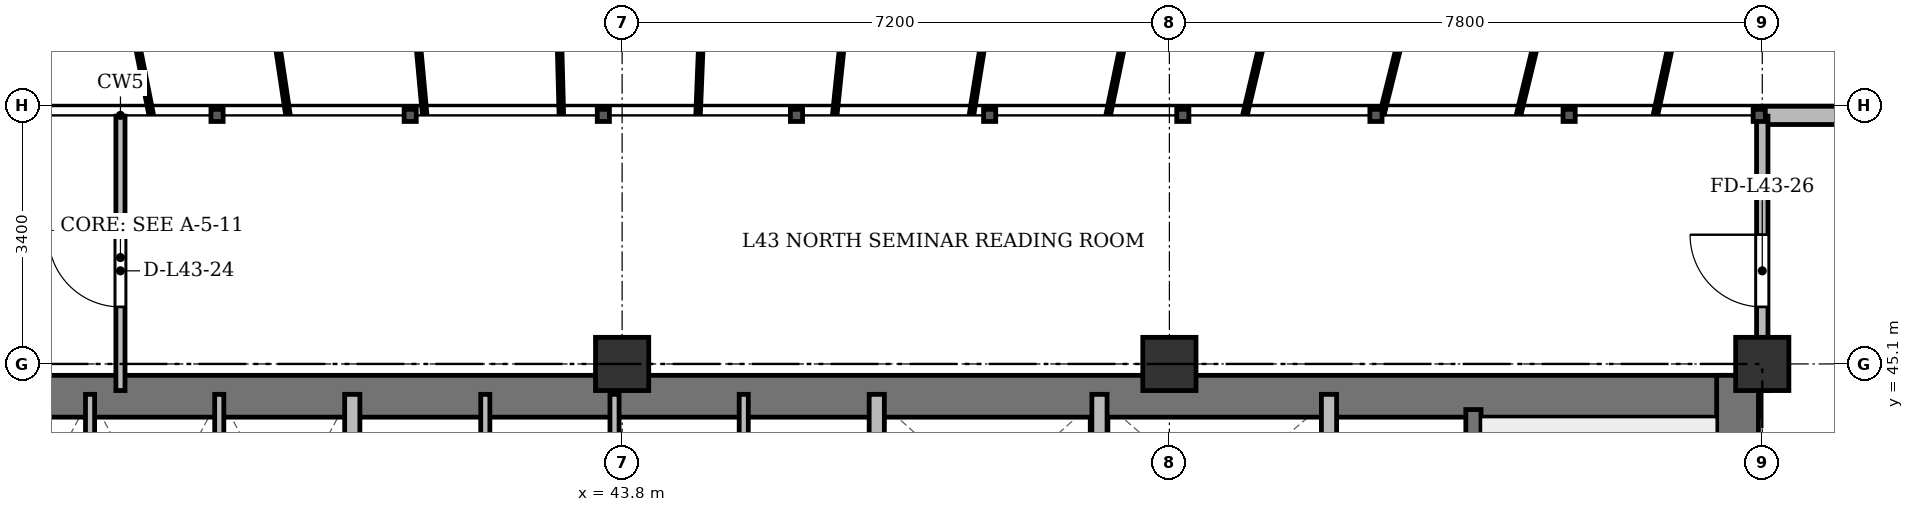
"""IFC4 building model, lengths in metres.
Left out: names, types, materials, properties, quantities, classifications, styles, units other than length and angle.
Written with IfcOpenShell. Run it as: python <this file> out.ifc"""

import sys

from ifc_helpers import new_model, si_unit, direction, frame, frame_2d, origin, origin_2d, place, context, subcontext, project, spatial, rectangle, extrude, source, transform, mapped, element, fill, save


model = new_model("IFC4")
c1 = context("Model", 3, precision=1e-05, world=origin(), true_north=direction((0.0, 1.0)))
c2 = subcontext(c1, "Body", "Model", "MODEL_VIEW")
j1 = project(units=[si_unit("LENGTHUNIT", "METRE"), si_unit("PLANEANGLEUNIT", "RADIAN")], contexts=[c1])
p1 = place(None, origin())
s1 = spatial("IfcSite", under=j1, at=p1, CompositionType="ELEMENT")
p2 = place(p1, origin())
s2 = spatial("IfcBuilding", under=s1, at=p2, CompositionType="ELEMENT")
p3 = place(p2, frame((0.0, 0.0, 164.5)))
s3 = spatial("IfcBuildingStorey", under=s2, at=p3, CompositionType="ELEMENT", Elevation=164.5)
m1 = source(origin(), c2, "Body", "SweptSolid", [
    extrude(rectangle(XDim=0.7, YDim=0.7, at=origin_2d()), origin(), (0.0, 0.0, 1.0), 3.6),
])
for number, where, z_axis, x_axis in (
    (1, (43.8, 45.1, 0.0), (0.0, 0.0, 1.0), (1.0, 0.0, 0.0)),
    (2, (51.0, 45.1, 0.0), (0.0, 0.0, 1.0), (1.0, 0.0, 0.0)),
    (3, (58.8, 45.1, 0.0), (0.0, 0.0, 1.0), (1.0, 0.0, 0.0)),
):
    element("IfcColumn", number, at=place(p3, frame(where, z_axis=z_axis, x_axis=x_axis)), inside=s3, PredefinedType="COLUMN", context=c2, shape_type="MappedRepresentation", body=[
        mapped(m1, transform((0.0, 0.0, 0.0), x_axis=(1.0, 0.0, 0.0), y_axis=(0.0, 1.0, 0.0), z_axis=(0.0, 0.0, 1.0), scale=1.0)),
    ])
p4 = place(p3, frame((58.8, 48.37, 0.0), z_axis=(0.0, 0.0, 1.0), x_axis=(1.0, 0.0, 0.0)))
e4 = element("IfcWall", 4, at=p4, inside=s3, PredefinedType="SOLIDWALL", context=c2, shape_type="SweptSolid", body=[
    extrude(rectangle(XDim=4.7, YDim=0.24, at=frame_2d((2.35, 0.0))), origin(), (0.0, 0.0, 1.0), 3.35),
])
p5 = place(p4, frame((1.675, 0.0, 0.9)))
e5 = element("IfcOpeningElement", 5, at=p5, cuts=e4, PredefinedType="OPENING", context=c2, shape_type="SweptSolid", body=[
    extrude(rectangle(XDim=1.35, YDim=1.5, at=frame_2d((0.675, 0.75))), frame((0.0, 0.13, 0.0), z_axis=(0.0, -1.0, 0.0), x_axis=(1.0, 0.0, 0.0)), (0.0, 0.0, 1.0), 0.26),
])
p6 = place(p3, frame((15.65, 44.675, 0.0), z_axis=(0.0, 0.0, 1.0), x_axis=(1.0, 0.0, 0.0)))
e6 = element("IfcWall", 6, at=p6, inside=s3, PredefinedType="SHEAR", context=c2, shape_type="SweptSolid", body=[
    extrude(rectangle(XDim=43.1, YDim=0.55, at=frame_2d((21.55, 0.0))), origin(), (0.0, 0.0, 1.0), 3.35),
])
p7 = place(p3, frame((58.475, 33.4, 0.0), z_axis=(0.0, 0.0, 1.0), x_axis=(0.0, 1.0, 0.0)))
e7 = element("IfcWall", 7, at=p7, inside=s3, PredefinedType="SHEAR", context=c2, shape_type="SweptSolid", body=[
    extrude(rectangle(XDim=11.55, YDim=0.55, at=frame_2d((5.775, 0.0))), origin(), (0.0, 0.0, 1.0), 3.35),
])
p8 = place(p3, frame((55.0, 33.4, 0.0), z_axis=(0.0, 0.0, 1.0), x_axis=(0.0, 1.0, 0.0)))
e8 = element("IfcWall", 8, at=p8, inside=s3, PredefinedType="SHEAR", context=c2, shape_type="SweptSolid", body=[
    extrude(rectangle(XDim=11.1, YDim=0.2, at=frame_2d((5.55, 0.0))), origin(), (0.0, 0.0, 1.0), 3.35),
])
p9 = place(p8, frame((0.85, 0.0, 0.0)))
e9 = element("IfcOpeningElement", 9, at=p9, cuts=e8, PredefinedType="OPENING", context=c2, shape_type="SweptSolid", body=[
    extrude(rectangle(XDim=1.1, YDim=2.15, at=frame_2d((0.55, 1.075))), frame((0.0, 0.11, 0.0), z_axis=(0.0, -1.0, 0.0), x_axis=(1.0, 0.0, 0.0)), (0.0, 0.0, 1.0), 0.22),
])
for number, where, z_axis, x_axis in (
    (10, (36.8, 41.5, 0.0), (0.0, 0.0, 1.0), (0.0, 1.0, 0.0)),
    (11, (38.5, 41.5, 0.0), (0.0, 0.0, 1.0), (0.0, 1.0, 0.0)),
):
    element("IfcWall", number, at=place(p3, frame(where, z_axis=z_axis, x_axis=x_axis)), inside=s3, PredefinedType="PARTITIONING", context=c2, shape_type="SweptSolid", body=[
        extrude(rectangle(XDim=3.2, YDim=0.12, at=frame_2d((1.6, 0.0))), origin(), (0.0, 0.0, 1.0), 3.35),
    ])
p10 = place(p3, frame((40.25, 41.5, 0.0), z_axis=(0.0, 0.0, 1.0), x_axis=(0.0, 1.0, 0.0)))
e12 = element("IfcWall", 12, at=p10, inside=s3, PredefinedType="SOLIDWALL", context=c2, shape_type="SweptSolid", body=[
    extrude(rectangle(XDim=3.2, YDim=0.2, at=frame_2d((1.6, 0.0))), origin(), (0.0, 0.0, 1.0), 3.35),
])
p11 = place(p3, frame((42.0, 41.5, 0.0), z_axis=(0.0, 0.0, 1.0), x_axis=(0.0, 1.0, 0.0)))
e13 = element("IfcWall", 13, at=p11, inside=s3, PredefinedType="PARTITIONING", context=c2, shape_type="SweptSolid", body=[
    extrude(rectangle(XDim=3.2, YDim=0.12, at=frame_2d((1.6, 0.0))), origin(), (0.0, 0.0, 1.0), 3.35),
])
p12 = place(p3, frame((43.7, 41.5, 0.0), z_axis=(0.0, 0.0, 1.0), x_axis=(0.0, 1.0, 0.0)))
e14 = element("IfcWall", 14, at=p12, inside=s3, PredefinedType="PARTITIONING", context=c2, shape_type="SweptSolid", body=[
    extrude(rectangle(XDim=3.2, YDim=0.12, at=frame_2d((1.6, 0.0))), origin(), (0.0, 0.0, 1.0), 2.85),
])
p13 = place(p3, frame((45.4, 41.5, 0.0), z_axis=(0.0, 0.0, 1.0), x_axis=(0.0, 1.0, 0.0)))
e15 = element("IfcWall", 15, at=p13, inside=s3, PredefinedType="PARTITIONING", context=c2, shape_type="SweptSolid", body=[
    extrude(rectangle(XDim=3.2, YDim=0.12, at=frame_2d((1.6, 0.0))), origin(), (0.0, 0.0, 1.0), 3.35),
])
p14 = place(p3, frame((47.15, 33.4, 0.0), z_axis=(0.0, 0.0, 1.0), x_axis=(0.0, 1.0, 0.0)))
e16 = element("IfcWall", 16, at=p14, inside=s3, PredefinedType="SOLIDWALL", context=c2, shape_type="SweptSolid", body=[
    extrude(rectangle(XDim=11.3, YDim=0.2, at=frame_2d((5.65, 0.0))), origin(), (0.0, 0.0, 1.0), 2.75),
])
for number, where, z_axis, x_axis in (
    (17, (50.08, 42.05, 0.0), (0.0, 0.0, 1.0), (0.0, 1.0, 0.0)),
    (18, (53.1, 42.05, 0.0), (0.0, 0.0, 1.0), (0.0, 1.0, 0.0)),
):
    element("IfcWall", number, at=place(p3, frame(where, z_axis=z_axis, x_axis=x_axis)), inside=s3, PredefinedType="SOLIDWALL", context=c2, shape_type="SweptSolid", body=[
        extrude(rectangle(XDim=2.65, YDim=0.2, at=frame_2d((1.325, 0.0))), origin(), (0.0, 0.0, 1.0), 3.35),
    ])
p15 = place(p3, frame((37.2, 44.75, 0.0), z_axis=(0.0, 0.0, 1.0), x_axis=(0.0, 1.0, 0.0)))
e19 = element("IfcWall", 19, at=p15, inside=s3, PredefinedType="PARTITIONING", context=c2, shape_type="SweptSolid", body=[
    extrude(rectangle(XDim=3.61, YDim=0.12, at=frame_2d((1.805, 0.0))), origin(), (0.0, 0.0, 1.0), 2.75),
])
p16 = place(p15, frame((1.1, 0.0, 0.0)))
e20 = element("IfcOpeningElement", 20, at=p16, cuts=e19, PredefinedType="OPENING", context=c2, shape_type="SweptSolid", body=[
    extrude(rectangle(XDim=0.95, YDim=2.15, at=frame_2d((0.475, 1.075))), frame((0.0, 0.07, 0.0), z_axis=(0.0, -1.0, 0.0), x_axis=(1.0, 0.0, 0.0)), (0.0, 0.0, 1.0), 0.14),
])
p17 = place(p3, frame((58.8, 44.75, 0.0), z_axis=(0.0, 0.0, 1.0), x_axis=(0.0, 1.0, 0.0)))
e21 = element("IfcWall", 21, at=p17, inside=s3, PredefinedType="PARTITIONING", context=c2, shape_type="SweptSolid", body=[
    extrude(rectangle(XDim=3.61, YDim=0.15, at=frame_2d((1.805, 0.0))), origin(), (0.0, 0.0, 1.0), 2.85),
])
p18 = place(p17, frame((1.1, 0.0, 0.0)))
e22 = element("IfcOpeningElement", 22, at=p18, cuts=e21, PredefinedType="OPENING", context=c2, shape_type="SweptSolid", body=[
    extrude(rectangle(XDim=0.95, YDim=2.15, at=frame_2d((0.475, 1.075))), frame((0.0, 0.085, 0.0), z_axis=(0.0, -1.0, 0.0), x_axis=(1.0, 0.0, 0.0)), (0.0, 0.0, 1.0), 0.17),
])
m2 = source(origin(), c2, "Body", "SweptSolid", [
    extrude(rectangle(XDim=0.95, YDim=2.15, at=frame_2d((0.475, 1.075))), frame((0.0, 0.025, 0.0), z_axis=(0.0, -1.0, 0.0), x_axis=(1.0, 0.0, 0.0)), (0.0, 0.0, 1.0), 0.05),
])
p19 = place(p16, origin())
e23 = element("IfcDoor", 23, at=p19, inside=s3, OperationType="SINGLE_SWING_RIGHT", PredefinedType="DOOR", context=c2, shape_type="MappedRepresentation", body=[
    mapped(m2, transform((0.0, 0.0, 0.0), x_axis=(1.0, 0.0, 0.0), y_axis=(0.0, 1.0, 0.0), z_axis=(0.0, 0.0, 1.0), scale=1.0)),
])
fill(e20, e23)
p20 = place(p18, origin())
e24 = element("IfcDoor", 24, at=p20, inside=s3, OperationType="SINGLE_SWING_RIGHT", PredefinedType="DOOR", context=c2, shape_type="MappedRepresentation", body=[
    mapped(m2, transform((0.0, 0.0, 0.0), x_axis=(1.0, 0.0, 0.0), y_axis=(0.0, 1.0, 0.0), z_axis=(0.0, 0.0, 1.0), scale=1.0)),
])
fill(e22, e24)
save(model, sys.argv[1])
